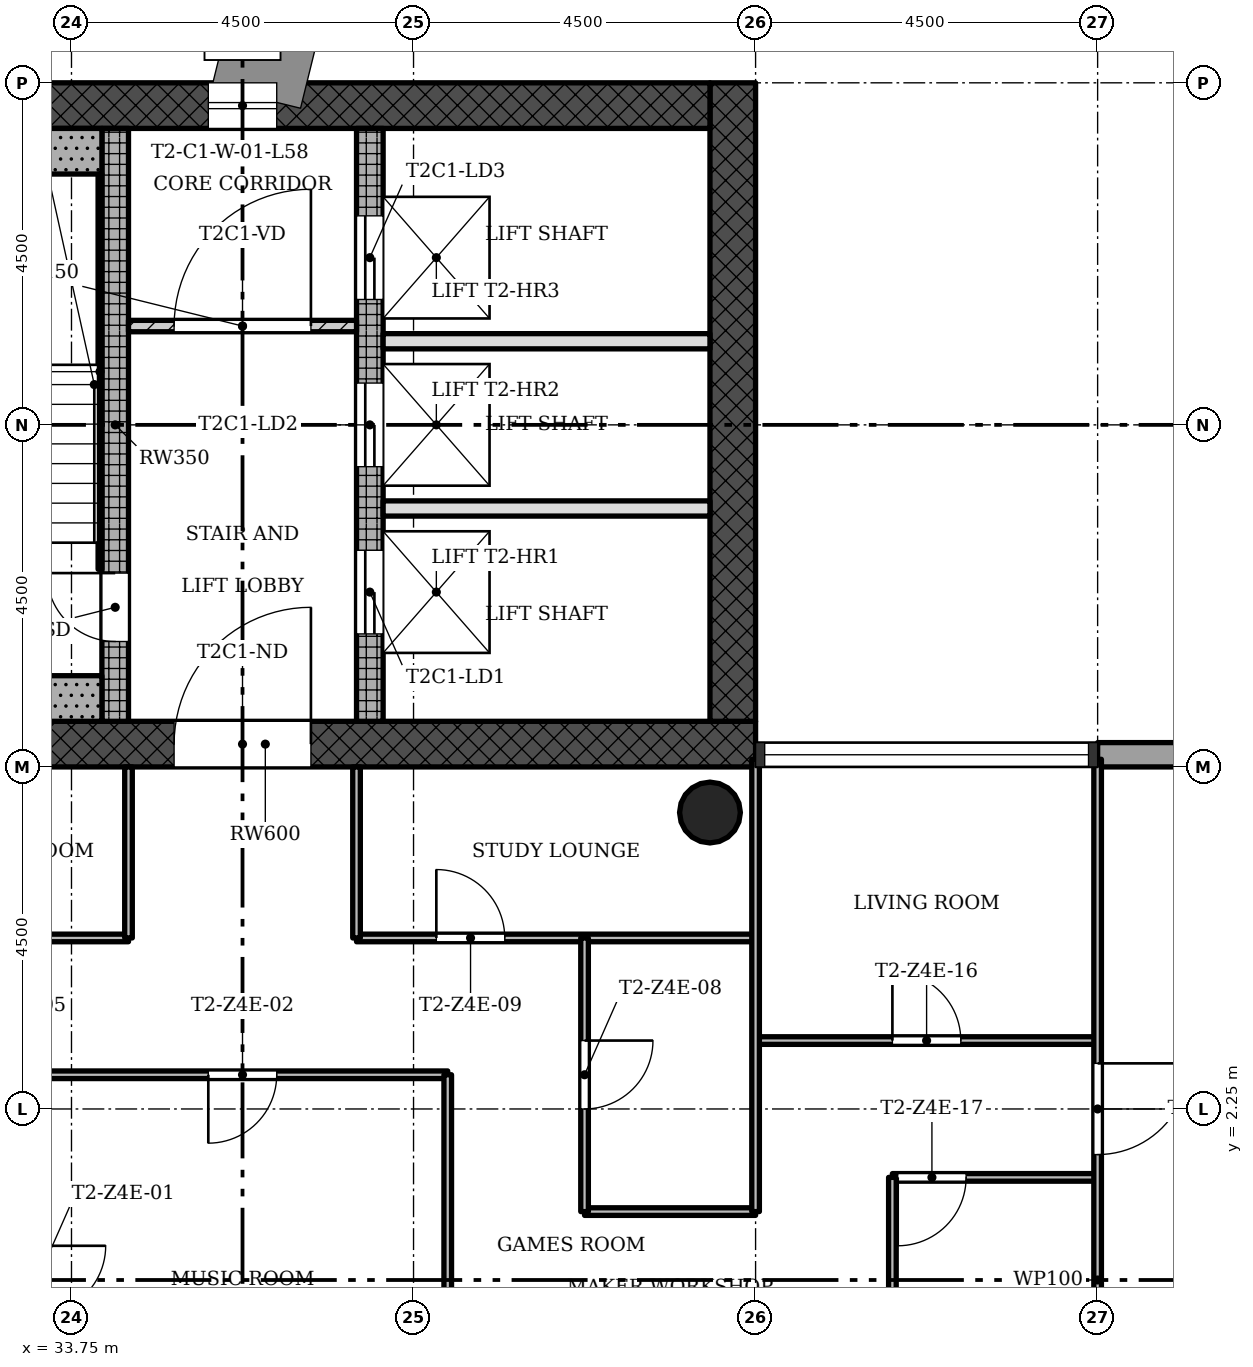
"""IFC4 building model, lengths in metres.
Left out: names, types, materials, properties, quantities, classifications, styles, units other than length and angle.
Written with IfcOpenShell. Run it as: python <this file> out.ifc"""

import sys

from ifc_helpers import new_model, si_unit, direction, frame, frame_2d, origin, origin_2d, place, context, subcontext, project, spatial, rectangle, hollow_circle, extrude, element, fill, save


model = new_model("IFC4")
c1 = context("Model", 3, precision=1e-05, world=origin(), true_north=direction((0.0, 1.0)))
c2 = subcontext(c1, "Body", "Model", "MODEL_VIEW")
j1 = project(units=[si_unit("LENGTHUNIT", "METRE"), si_unit("PLANEANGLEUNIT", "RADIAN")], contexts=[c1])
p1 = place(None, origin())
s1 = spatial("IfcSite", under=j1, at=p1, CompositionType="ELEMENT")
p2 = place(p1, origin())
s2 = spatial("IfcBuilding", under=s1, at=p2, CompositionType="ELEMENT")
p3 = place(p2, frame((0.0, 0.0, 209.6)))
s3 = spatial("IfcBuildingStorey", under=s2, at=p3, CompositionType="ELEMENT", Elevation=209.6)
p4 = place(p3, frame((29.85, 7.05, 0.0), z_axis=(0.0, 0.0, 1.0), x_axis=(1.0, 0.0, 0.0)))
e1 = element("IfcWall", 1, at=p4, inside=s3, PredefinedType="SHEAR", context=c2, shape_type="SweptSolid", body=[
    extrude(rectangle(XDim=12.9, YDim=0.6, at=frame_2d((6.45, 0.0))), origin(), (0.0, 0.0, 1.0), 3.4),
])
p5 = place(p4, frame((5.25, 0.0, 0.0)))
e2 = element("IfcOpeningElement", 2, at=p5, cuts=e1, PredefinedType="OPENING", context=c2, shape_type="SweptSolid", body=[
    extrude(rectangle(XDim=1.8, YDim=2.1, at=frame_2d((0.9, 1.05))), frame((0.0, 0.31, 0.0), z_axis=(0.0, -1.0, 0.0), x_axis=(1.0, 0.0, 0.0)), (0.0, 0.0, 1.0), 0.62),
])
p6 = place(p3, frame((42.45, 7.35, 0.0), z_axis=(0.0, 0.0, 1.0), x_axis=(0.0, 1.0, 0.0)))
e3 = element("IfcWall", 3, at=p6, inside=s3, PredefinedType="SHEAR", context=c2, shape_type="SweptSolid", body=[
    extrude(rectangle(XDim=8.4, YDim=0.6, at=frame_2d((4.2, 0.0))), origin(), (0.0, 0.0, 1.0), 3.4),
])
p7 = place(p3, frame((42.15, 15.45, 0.0), z_axis=(0.0, 0.0, 1.0), x_axis=(-1.0, 0.0, 0.0)))
e4 = element("IfcWall", 4, at=p7, inside=s3, PredefinedType="SHEAR", context=c2, shape_type="SweptSolid", body=[
    extrude(rectangle(XDim=12.9, YDim=0.6, at=frame_2d((6.45, 0.0))), origin(), (0.0, 0.0, 1.0), 3.4),
])
p8 = place(p7, frame((5.7, 0.0, 0.45)))
e5 = element("IfcOpeningElement", 5, at=p8, cuts=e4, PredefinedType="OPENING", context=c2, shape_type="SweptSolid", body=[
    extrude(rectangle(XDim=0.9, YDim=2.4, at=frame_2d((0.45, 1.2))), frame((0.0, 0.31, 0.0), z_axis=(0.0, -1.0, 0.0), x_axis=(1.0, 0.0, 0.0)), (0.0, 0.0, 1.0), 0.62),
])
p9 = place(p3, frame((34.325, 7.35, 0.0), z_axis=(0.0, 0.0, 1.0), x_axis=(0.0, 1.0, 0.0)))
e6 = element("IfcWall", 6, at=p9, inside=s3, PredefinedType="SHEAR", context=c2, shape_type="SweptSolid", body=[
    extrude(rectangle(XDim=7.8, YDim=0.35, at=frame_2d((3.9, 0.0))), origin(), (0.0, 0.0, 1.0), 3.4),
])
p10 = place(p9, frame((1.05, 0.0, 0.0)))
e7 = element("IfcOpeningElement", 7, at=p10, cuts=e6, PredefinedType="OPENING", context=c2, shape_type="SweptSolid", body=[
    extrude(rectangle(XDim=0.9, YDim=2.1, at=frame_2d((0.45, 1.05))), frame((0.0, 0.185, 0.0), z_axis=(0.0, -1.0, 0.0), x_axis=(1.0, 0.0, 0.0)), (0.0, 0.0, 1.0), 0.37),
])
p11 = place(p3, frame((37.675, 7.35, 0.0), z_axis=(0.0, 0.0, 1.0), x_axis=(0.0, 1.0, 0.0)))
e8 = element("IfcWall", 8, at=p11, inside=s3, PredefinedType="SHEAR", context=c2, shape_type="SweptSolid", body=[
    extrude(rectangle(XDim=7.8, YDim=0.35, at=frame_2d((3.9, 0.0))), origin(), (0.0, 0.0, 1.0), 3.4),
])
p12 = place(p11, frame((1.15, 0.0, 0.0)))
e9 = element("IfcOpeningElement", 9, at=p12, cuts=e8, PredefinedType="OPENING", context=c2, shape_type="SweptSolid", body=[
    extrude(rectangle(XDim=1.1, YDim=2.1, at=frame_2d((0.55, 1.05))), frame((0.0, 0.185, 0.0), z_axis=(0.0, -1.0, 0.0), x_axis=(1.0, 0.0, 0.0)), (0.0, 0.0, 1.0), 0.37),
])
p13 = place(p11, frame((3.35, 0.0, 0.0)))
e10 = element("IfcOpeningElement", 10, at=p13, cuts=e8, PredefinedType="OPENING", context=c2, shape_type="SweptSolid", body=[
    extrude(rectangle(XDim=1.1, YDim=2.1, at=frame_2d((0.55, 1.05))), frame((0.0, 0.185, 0.0), z_axis=(0.0, -1.0, 0.0), x_axis=(1.0, 0.0, 0.0)), (0.0, 0.0, 1.0), 0.37),
])
p14 = place(p11, frame((5.55, 0.0, 0.0)))
e11 = element("IfcOpeningElement", 11, at=p14, cuts=e8, PredefinedType="OPENING", context=c2, shape_type="SweptSolid", body=[
    extrude(rectangle(XDim=1.1, YDim=2.1, at=frame_2d((0.55, 1.05))), frame((0.0, 0.185, 0.0), z_axis=(0.0, -1.0, 0.0), x_axis=(1.0, 0.0, 0.0)), (0.0, 0.0, 1.0), 0.37),
])
p15 = place(p3, frame((42.15, 6.15, 0.0), z_axis=(0.0, 0.0, 1.0), x_axis=(1.0, 0.0, 0.0)))
e12 = element("IfcColumn", 12, at=p15, inside=s3, PredefinedType="COLUMN", context=c2, shape_type="SweptSolid", body=[
    extrude(hollow_circle(Radius=0.4, WallThickness=0.028, at=origin_2d()), origin(), (0.0, 0.0, 1.0), 3.4),
])
p16 = place(p3, frame((48.75, 6.91, -0.3), z_axis=(0.0, 0.0, 1.0), x_axis=(-1.0, 0.0, 0.0)))
e13 = element("IfcWall", 13, at=p16, inside=s3, PredefinedType="STANDARD", context=c2, shape_type="SweptSolid", body=[
    extrude(rectangle(XDim=1.5, YDim=0.32, at=frame_2d((0.75, 0.0))), origin(), (0.0, 0.0, 1.0), 3.4),
])
p17 = place(p3, frame((37.5, 12.55, 0.0), z_axis=(0.0, 0.0, 1.0), x_axis=(-1.0, 0.0, 0.0)))
e14 = element("IfcWall", 14, at=p17, inside=s3, PredefinedType="PARTITIONING", context=c2, shape_type="SweptSolid", body=[
    extrude(rectangle(XDim=3.0, YDim=0.15, at=frame_2d((1.5, 0.0))), origin(), (0.0, 0.0, 1.0), 3.0),
])
p18 = place(p17, frame((0.6, 0.0, 0.0)))
e15 = element("IfcOpeningElement", 15, at=p18, cuts=e14, PredefinedType="OPENING", context=c2, shape_type="SweptSolid", body=[
    extrude(rectangle(XDim=1.8, YDim=2.1, at=frame_2d((0.9, 1.05))), frame((0.0, 0.085, 0.0), z_axis=(0.0, -1.0, 0.0), x_axis=(1.0, 0.0, 0.0)), (0.0, 0.0, 1.0), 0.17),
])
for number, where, z_axis, x_axis in (
    (16, (42.15, 10.15, 0.0), (0.0, 0.0, 1.0), (-1.0, 0.0, 0.0)),
    (17, (42.15, 12.35, 0.0), (0.0, 0.0, 1.0), (-1.0, 0.0, 0.0)),
):
    element("IfcWall", number, at=place(p3, frame(where, z_axis=z_axis, x_axis=x_axis)), inside=s3, PredefinedType="SOLIDWALL", context=c2, shape_type="SweptSolid", body=[
        extrude(rectangle(XDim=4.3, YDim=0.2, at=frame_2d((2.15, 0.0))), origin(), (0.0, 0.0, 1.0), 3.0),
    ])
p19 = place(p3, frame((42.75, 0.9, 0.0), z_axis=(0.0, 0.0, 1.0), x_axis=(-1.0, 0.0, 0.0)))
e18 = element("IfcWall", 18, at=p19, inside=s3, PredefinedType="PARTITIONING", context=c2, shape_type="SweptSolid", body=[
    extrude(rectangle(XDim=2.25, YDim=0.1, at=frame_2d((1.125, 0.0))), origin(), (0.0, 0.0, 1.0), 3.0),
])
p20 = place(p3, frame((47.25, 1.35, 0.0), z_axis=(0.0, 0.0, 1.0), x_axis=(-1.0, 0.0, 0.0)))
e19 = element("IfcWall", 19, at=p20, inside=s3, PredefinedType="PARTITIONING", context=c2, shape_type="SweptSolid", body=[
    extrude(rectangle(XDim=2.7, YDim=0.1, at=frame_2d((1.35, 0.0))), origin(), (0.0, 0.0, 1.0), 3.0),
])
p21 = place(p20, frame((1.73, 0.0, 0.0)))
e20 = element("IfcOpeningElement", 20, at=p21, cuts=e19, PredefinedType="OPENING", context=c2, shape_type="SweptSolid", body=[
    extrude(rectangle(XDim=0.9, YDim=2.1, at=frame_2d((0.45, 1.05))), frame((0.0, 0.06, 0.0), z_axis=(0.0, -1.0, 0.0), x_axis=(1.0, 0.0, 0.0)), (0.0, 0.0, 1.0), 0.12),
])
p22 = place(p3, frame((38.7, 2.7, 0.0), z_axis=(0.0, 0.0, 1.0), x_axis=(-1.0, 0.0, 0.0)))
e21 = element("IfcWall", 21, at=p22, inside=s3, PredefinedType="PARTITIONING", context=c2, shape_type="SweptSolid", body=[
    extrude(rectangle(XDim=5.4, YDim=0.1, at=frame_2d((2.7, 0.0))), origin(), (0.0, 0.0, 1.0), 3.0),
])
p23 = place(p22, frame((2.25, 0.0, 0.0)))
e22 = element("IfcOpeningElement", 22, at=p23, cuts=e21, PredefinedType="OPENING", context=c2, shape_type="SweptSolid", body=[
    extrude(rectangle(XDim=0.9, YDim=2.1, at=frame_2d((0.45, 1.05))), frame((0.0, 0.06, 0.0), z_axis=(0.0, -1.0, 0.0), x_axis=(1.0, 0.0, 0.0)), (0.0, 0.0, 1.0), 0.12),
])
p24 = place(p3, frame((47.25, 3.15, 0.0), z_axis=(0.0, 0.0, 1.0), x_axis=(-1.0, 0.0, 0.0)))
e23 = element("IfcWall", 23, at=p24, inside=s3, PredefinedType="PARTITIONING", context=c2, shape_type="SweptSolid", body=[
    extrude(rectangle(XDim=4.5, YDim=0.1, at=frame_2d((2.25, 0.0))), origin(), (0.0, 0.0, 1.0), 3.0),
])
p25 = place(p24, frame((1.8, 0.0, 0.0)))
e24 = element("IfcOpeningElement", 24, at=p25, cuts=e23, PredefinedType="OPENING", context=c2, shape_type="SweptSolid", body=[
    extrude(rectangle(XDim=0.9, YDim=2.1, at=frame_2d((0.45, 1.05))), frame((0.0, 0.06, 0.0), z_axis=(0.0, -1.0, 0.0), x_axis=(1.0, 0.0, 0.0)), (0.0, 0.0, 1.0), 0.12),
])
p26 = place(p3, frame((42.75, 4.5, 0.0), z_axis=(0.0, 0.0, 1.0), x_axis=(-1.0, 0.0, 0.0)))
e25 = element("IfcWall", 25, at=p26, inside=s3, PredefinedType="PARTITIONING", context=c2, shape_type="SweptSolid", body=[
    extrude(rectangle(XDim=5.25, YDim=0.1, at=frame_2d((2.625, 0.0))), origin(), (0.0, 0.0, 1.0), 3.0),
])
p27 = place(p26, frame((3.3, 0.0, 0.0)))
e26 = element("IfcOpeningElement", 26, at=p27, cuts=e25, PredefinedType="OPENING", context=c2, shape_type="SweptSolid", body=[
    extrude(rectangle(XDim=0.9, YDim=2.1, at=frame_2d((0.45, 1.05))), frame((0.0, 0.06, 0.0), z_axis=(0.0, -1.0, 0.0), x_axis=(1.0, 0.0, 0.0)), (0.0, 0.0, 1.0), 0.12),
])
p28 = place(p3, frame((34.5, 4.5, 0.0), z_axis=(0.0, 0.0, 1.0), x_axis=(-1.0, 0.0, 0.0)))
e27 = element("IfcWall", 27, at=p28, inside=s3, PredefinedType="PARTITIONING", context=c2, shape_type="SweptSolid", body=[
    extrude(rectangle(XDim=3.0, YDim=0.1, at=frame_2d((1.5, 0.0))), origin(), (0.0, 0.0, 1.0), 3.0),
])
p29 = place(p28, frame((1.05, 0.0, 0.0)))
e28 = element("IfcOpeningElement", 28, at=p29, cuts=e27, PredefinedType="OPENING", context=c2, shape_type="SweptSolid", body=[
    extrude(rectangle(XDim=0.9, YDim=2.1, at=frame_2d((0.45, 1.05))), frame((0.0, 0.06, 0.0), z_axis=(0.0, -1.0, 0.0), x_axis=(1.0, 0.0, 0.0)), (0.0, 0.0, 1.0), 0.12),
])
p30 = place(p3, frame((47.25, -6.85, 0.0), z_axis=(0.0, 0.0, 1.0), x_axis=(0.0, 1.0, 0.0)))
e29 = element("IfcWall", 29, at=p30, inside=s3, PredefinedType="PARTITIONING", context=c2, shape_type="SweptSolid", body=[
    extrude(rectangle(XDim=13.7, YDim=0.1, at=frame_2d((6.85, 0.0))), origin(), (0.0, 0.0, 1.0), 3.0),
])
p31 = place(p30, frame((8.5, 0.0, 0.0)))
e30 = element("IfcOpeningElement", 30, at=p31, cuts=e29, PredefinedType="OPENING", context=c2, shape_type="SweptSolid", body=[
    extrude(rectangle(XDim=1.2, YDim=2.1, at=frame_2d((0.6, 1.05))), frame((0.0, 0.06, 0.0), z_axis=(0.0, -1.0, 0.0), x_axis=(1.0, 0.0, 0.0)), (0.0, 0.0, 1.0), 0.12),
])
p32 = place(p3, frame((44.55, -0.9, 0.0), z_axis=(0.0, 0.0, 1.0), x_axis=(0.0, 1.0, 0.0)))
e31 = element("IfcWall", 31, at=p32, inside=s3, PredefinedType="PARTITIONING", context=c2, shape_type="SweptSolid", body=[
    extrude(rectangle(XDim=2.25, YDim=0.1, at=frame_2d((1.125, 0.0))), origin(), (0.0, 0.0, 1.0), 3.0),
])
p33 = place(p3, frame((42.75, 0.9, 0.0), z_axis=(0.0, 0.0, 1.0), x_axis=(0.0, 1.0, 0.0)))
e32 = element("IfcWall", 32, at=p33, inside=s3, PredefinedType="PARTITIONING", context=c2, shape_type="SweptSolid", body=[
    extrude(rectangle(XDim=5.95, YDim=0.1, at=frame_2d((2.975, 0.0))), origin(), (0.0, 0.0, 1.0), 3.0),
])
p34 = place(p3, frame((40.5, 0.9, 0.0), z_axis=(0.0, 0.0, 1.0), x_axis=(0.0, 1.0, 0.0)))
e33 = element("IfcWall", 33, at=p34, inside=s3, PredefinedType="PARTITIONING", context=c2, shape_type="SweptSolid", body=[
    extrude(rectangle(XDim=3.6, YDim=0.1, at=frame_2d((1.8, 0.0))), origin(), (0.0, 0.0, 1.0), 3.0),
])
p35 = place(p34, frame((1.35, 0.0, 0.0)))
e34 = element("IfcOpeningElement", 34, at=p35, cuts=e33, PredefinedType="OPENING", context=c2, shape_type="SweptSolid", body=[
    extrude(rectangle(XDim=0.9, YDim=2.1, at=frame_2d((0.45, 1.05))), frame((0.0, 0.06, 0.0), z_axis=(0.0, -1.0, 0.0), x_axis=(1.0, 0.0, 0.0)), (0.0, 0.0, 1.0), 0.12),
])
p36 = place(p3, frame((38.7, -2.7, 0.0), z_axis=(0.0, 0.0, 1.0), x_axis=(0.0, 1.0, 0.0)))
e35 = element("IfcWall", 35, at=p36, inside=s3, PredefinedType="PARTITIONING", context=c2, shape_type="SweptSolid", body=[
    extrude(rectangle(XDim=5.4, YDim=0.1, at=frame_2d((2.7, 0.0))), origin(), (0.0, 0.0, 1.0), 3.0),
])
for number, where, z_axis, x_axis in (
    (36, (37.5, 4.5, 0.0), (0.0, 0.0, 1.0), (0.0, 1.0, 0.0)),
    (37, (34.5, 4.5, 0.0), (0.0, 0.0, 1.0), (0.0, 1.0, 0.0)),
):
    element("IfcWall", number, at=place(p3, frame(where, z_axis=z_axis, x_axis=x_axis)), inside=s3, PredefinedType="PARTITIONING", context=c2, shape_type="SweptSolid", body=[
        extrude(rectangle(XDim=2.25, YDim=0.1, at=frame_2d((1.125, 0.0))), origin(), (0.0, 0.0, 1.0), 3.0),
    ])
for number, where, z_axis, x_axis in (
    (38, (34.15, 14.85, 0.0), (0.0, 0.0, 1.0), (-1.0, 0.0, 0.0)),
    (39, (34.15, 7.65, 0.0), (0.0, 0.0, 1.0), (-1.0, 0.0, 0.0)),
):
    element("IfcWall", number, at=place(p3, frame(where, z_axis=z_axis, x_axis=x_axis)), inside=s3, PredefinedType="SHEAR", context=c2, shape_type="SweptSolid", body=[
        extrude(rectangle(XDim=4.3, YDim=0.6, at=frame_2d((2.15, 0.0))), origin(), (0.0, 0.0, 1.0), 3.4),
    ])
p37 = place(p3, frame((34.125, 9.35, 0.0), z_axis=(0.0, 0.0, 1.0), x_axis=(0.0, 1.0, 0.0)))
e40 = element("IfcWall", 40, at=p37, inside=s3, PredefinedType="SHEAR", context=c2, shape_type="SweptSolid", body=[
    extrude(rectangle(XDim=5.2, YDim=0.05, at=frame_2d((2.6, 0.0))), origin(), (0.0, 0.0, 1.0), 3.4),
])
p38 = place(p8, origin())
e41 = element("IfcWindow", 41, at=p38, inside=s3, PartitioningType="SINGLE_PANEL", PredefinedType="WINDOW", context=c2, shape_type="SweptSolid", body=[
    extrude(rectangle(XDim=0.9, YDim=2.4, at=frame_2d((0.45, 1.2))), frame((0.0, 0.03, 0.0), z_axis=(0.0, -1.0, 0.0), x_axis=(1.0, 0.0, 0.0)), (0.0, 0.0, 1.0), 0.06),
])
fill(e5, e41)
p39 = place(p18, origin())
e42 = element("IfcDoor", 42, at=p39, inside=s3, OperationType="SINGLE_SWING_LEFT", PredefinedType="DOOR", context=c2, shape_type="SweptSolid", body=[
    extrude(rectangle(XDim=1.8, YDim=2.1, at=frame_2d((0.9, 1.05))), frame((0.0, 0.025, 0.0), z_axis=(0.0, -1.0, 0.0), x_axis=(1.0, 0.0, 0.0)), (0.0, 0.0, 1.0), 0.05),
])
fill(e15, e42)
p40 = place(p23, origin())
e43 = element("IfcDoor", 43, at=p40, inside=s3, OperationType="SINGLE_SWING_LEFT", PredefinedType="DOOR", context=c2, shape_type="SweptSolid", body=[
    extrude(rectangle(XDim=0.9, YDim=2.1, at=frame_2d((0.45, 1.05))), frame((0.0, 0.025, 0.0), z_axis=(0.0, -1.0, 0.0), x_axis=(1.0, 0.0, 0.0)), (0.0, 0.0, 1.0), 0.05),
])
fill(e22, e43)
p41 = place(p35, origin())
e44 = element("IfcDoor", 44, at=p41, inside=s3, OperationType="SINGLE_SWING_RIGHT", PredefinedType="DOOR", context=c2, shape_type="SweptSolid", body=[
    extrude(rectangle(XDim=0.9, YDim=2.1, at=frame_2d((0.45, 1.05))), frame((0.0, 0.025, 0.0), z_axis=(0.0, -1.0, 0.0), x_axis=(1.0, 0.0, 0.0)), (0.0, 0.0, 1.0), 0.05),
])
fill(e34, e44)
p42 = place(p27, origin())
e45 = element("IfcDoor", 45, at=p42, inside=s3, OperationType="SINGLE_SWING_RIGHT", PredefinedType="DOOR", context=c2, shape_type="SweptSolid", body=[
    extrude(rectangle(XDim=0.9, YDim=2.1, at=frame_2d((0.45, 1.05))), frame((0.0, 0.025, 0.0), z_axis=(0.0, -1.0, 0.0), x_axis=(1.0, 0.0, 0.0)), (0.0, 0.0, 1.0), 0.05),
])
fill(e26, e45)
p43 = place(p25, origin())
e46 = element("IfcDoor", 46, at=p43, inside=s3, OperationType="SINGLE_SWING_RIGHT", PredefinedType="DOOR", context=c2, shape_type="SweptSolid", body=[
    extrude(rectangle(XDim=0.9, YDim=2.1, at=frame_2d((0.45, 1.05))), frame((0.0, 0.025, 0.0), z_axis=(0.0, -1.0, 0.0), x_axis=(1.0, 0.0, 0.0)), (0.0, 0.0, 1.0), 0.05),
])
fill(e24, e46)
p44 = place(p21, origin())
e47 = element("IfcDoor", 47, at=p44, inside=s3, OperationType="SINGLE_SWING_LEFT", PredefinedType="DOOR", context=c2, shape_type="SweptSolid", body=[
    extrude(rectangle(XDim=0.9, YDim=2.1, at=frame_2d((0.45, 1.05))), frame((0.0, 0.025, 0.0), z_axis=(0.0, -1.0, 0.0), x_axis=(1.0, 0.0, 0.0)), (0.0, 0.0, 1.0), 0.05),
])
fill(e20, e47)
p45 = place(p31, origin())
e48 = element("IfcDoor", 48, at=p45, inside=s3, OperationType="SINGLE_SWING_RIGHT", PredefinedType="DOOR", context=c2, shape_type="SweptSolid", body=[
    extrude(rectangle(XDim=1.2, YDim=2.1, at=frame_2d((0.6, 1.05))), frame((0.0, 0.025, 0.0), z_axis=(0.0, -1.0, 0.0), x_axis=(1.0, 0.0, 0.0)), (0.0, 0.0, 1.0), 0.05),
])
fill(e30, e48)
p46 = place(p10, origin())
e49 = element("IfcDoor", 49, at=p46, inside=s3, OperationType="SINGLE_SWING_LEFT", PredefinedType="DOOR", context=c2, shape_type="SweptSolid", body=[
    extrude(rectangle(XDim=0.9, YDim=2.1, at=frame_2d((0.45, 1.05))), frame((0.0, 0.025, 0.0), z_axis=(0.0, -1.0, 0.0), x_axis=(1.0, 0.0, 0.0)), (0.0, 0.0, 1.0), 0.05),
])
fill(e7, e49)
p47 = place(p12, origin())
e50 = element("IfcDoor", 50, at=p47, inside=s3, OperationType="SLIDING_TO_LEFT", PredefinedType="DOOR", context=c2, shape_type="SweptSolid", body=[
    extrude(rectangle(XDim=1.1, YDim=2.1, at=frame_2d((0.55, 1.05))), frame((0.0, 0.025, 0.0), z_axis=(0.0, -1.0, 0.0), x_axis=(1.0, 0.0, 0.0)), (0.0, 0.0, 1.0), 0.05),
])
fill(e9, e50)
p48 = place(p13, origin())
e51 = element("IfcDoor", 51, at=p48, inside=s3, OperationType="SLIDING_TO_LEFT", PredefinedType="DOOR", context=c2, shape_type="SweptSolid", body=[
    extrude(rectangle(XDim=1.1, YDim=2.1, at=frame_2d((0.55, 1.05))), frame((0.0, 0.025, 0.0), z_axis=(0.0, -1.0, 0.0), x_axis=(1.0, 0.0, 0.0)), (0.0, 0.0, 1.0), 0.05),
])
fill(e10, e51)
p49 = place(p14, origin())
e52 = element("IfcDoor", 52, at=p49, inside=s3, OperationType="SLIDING_TO_LEFT", PredefinedType="DOOR", context=c2, shape_type="SweptSolid", body=[
    extrude(rectangle(XDim=1.1, YDim=2.1, at=frame_2d((0.55, 1.05))), frame((0.0, 0.025, 0.0), z_axis=(0.0, -1.0, 0.0), x_axis=(1.0, 0.0, 0.0)), (0.0, 0.0, 1.0), 0.05),
])
fill(e11, e52)
p50 = place(p5, origin())
e53 = element("IfcDoor", 53, at=p50, inside=s3, OperationType="SINGLE_SWING_LEFT", PredefinedType="DOOR", context=c2, shape_type="SweptSolid", body=[
    extrude(rectangle(XDim=1.8, YDim=2.1, at=frame_2d((0.9, 1.05))), frame((0.0, 0.025, 0.0), z_axis=(0.0, -1.0, 0.0), x_axis=(1.0, 0.0, 0.0)), (0.0, 0.0, 1.0), 0.05),
])
fill(e2, e53)
save(model, sys.argv[1])
